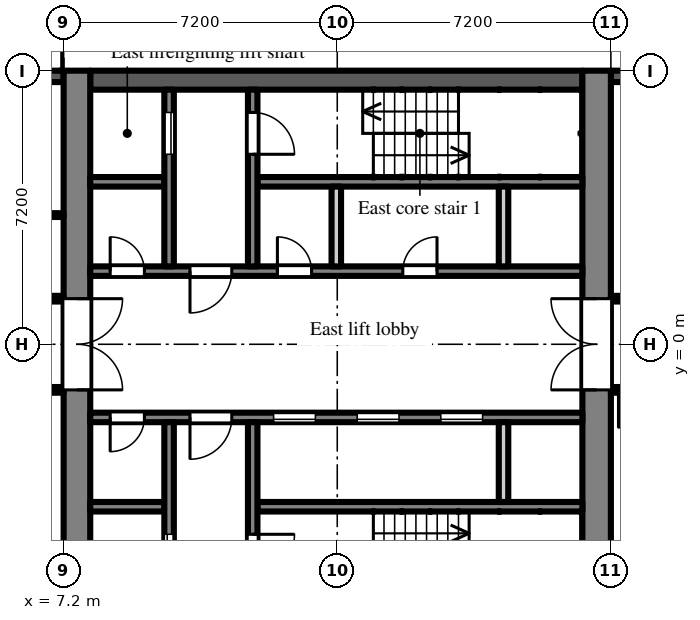
"""IFC4 building model, lengths in metres.
Left out: names, types, materials, properties, quantities, classifications, styles, units other than length and angle.
Written with IfcOpenShell. Run it as: python <this file> out.ifc"""

import sys

from ifc_helpers import new_model, si_unit, direction, frame, frame_2d, origin, place, context, subcontext, project, spatial, rectangle, extrude, element, fill, save


model = new_model("IFC4")
c1 = context("Model", 3, precision=1e-05, world=origin(), true_north=direction((0.0, 1.0)))
c2 = subcontext(c1, "Body", "Model", "MODEL_VIEW")
j1 = project(units=[si_unit("LENGTHUNIT", "METRE"), si_unit("PLANEANGLEUNIT", "RADIAN")], contexts=[c1])
p1 = place(None, origin())
s1 = spatial("IfcSite", under=j1, at=p1, CompositionType="ELEMENT")
p2 = place(p1, origin())
s2 = spatial("IfcBuilding", under=s1, at=p2, CompositionType="ELEMENT")
p3 = place(p2, frame((0.0, 0.0, 102.9)))
s3 = spatial("IfcBuildingStorey", under=s2, at=p3, CompositionType="ELEMENT", Elevation=102.9)
p4 = place(p3, frame((24.3, 7.05, 0.0), z_axis=(0.0, 0.0, 1.0), x_axis=(-1.0, 0.0, 0.0)))
e1 = element("IfcWall", 1, at=p4, inside=s3, PredefinedType="SOLIDWALL", context=c2, shape_type="SweptSolid", body=[
    extrude(rectangle(XDim=2.7, YDim=0.3, at=frame_2d((1.35, 0.0))), origin(), (0.0, 0.0, 1.0), 2.1),
])
p5 = place(p3, frame((7.2, 7.05, 0.0), z_axis=(0.0, 0.0, 1.0), x_axis=(-1.0, 0.0, 0.0)))
e2 = element("IfcWall", 2, at=p5, inside=s3, PredefinedType="SOLIDWALL", context=c2, shape_type="SweptSolid", body=[
    extrude(rectangle(XDim=3.0, YDim=0.3, at=frame_2d((1.5, 0.0))), origin(), (0.0, 0.0, 1.0), 2.1),
])
p6 = place(p3, frame((7.55, -7.2, 0.0), z_axis=(0.0, 0.0, 1.0), x_axis=(0.0, 1.0, 0.0)))
e3 = element("IfcWall", 3, at=p6, inside=s3, PredefinedType="SHEAR", context=c2, shape_type="SweptSolid", body=[
    extrude(rectangle(XDim=14.4, YDim=0.7, at=frame_2d((7.2, 0.0))), origin(), (0.0, 0.0, 1.0), 2.575),
])
p7 = place(p6, frame((6.0, 0.0, 0.0)))
e4 = element("IfcOpeningElement", 4, at=p7, cuts=e3, PredefinedType="OPENING", context=c2, shape_type="SweptSolid", body=[
    extrude(rectangle(XDim=2.4, YDim=2.2, at=frame_2d((1.2, 1.1))), frame((0.0, 0.36, 0.0), z_axis=(0.0, -1.0, 0.0), x_axis=(1.0, 0.0, 0.0)), (0.0, 0.0, 1.0), 0.72),
])
p8 = place(p3, frame((21.225, -7.2, 0.0), z_axis=(0.0, 0.0, 1.0), x_axis=(0.0, 1.0, 0.0)))
e5 = element("IfcWall", 5, at=p8, inside=s3, PredefinedType="SHEAR", context=c2, shape_type="SweptSolid", body=[
    extrude(rectangle(XDim=14.4, YDim=0.75, at=frame_2d((7.2, 0.0))), origin(), (0.0, 0.0, 1.0), 2.575),
])
p9 = place(p8, frame((6.0, 0.0, 0.0)))
e6 = element("IfcOpeningElement", 6, at=p9, cuts=e5, PredefinedType="OPENING", context=c2, shape_type="SweptSolid", body=[
    extrude(rectangle(XDim=2.4, YDim=2.2, at=frame_2d((1.2, 1.1))), frame((0.0, 0.385, 0.0), z_axis=(0.0, -1.0, 0.0), x_axis=(1.0, 0.0, 0.0)), (0.0, 0.0, 1.0), 0.77),
])
p10 = place(p3, frame((7.9, 6.95, 0.0), z_axis=(0.0, 0.0, 1.0), x_axis=(1.0, 0.0, 0.0)))
e7 = element("IfcWall", 7, at=p10, inside=s3, PredefinedType="SHEAR", context=c2, shape_type="SweptSolid", body=[
    extrude(rectangle(XDim=12.95, YDim=0.5, at=frame_2d((6.475, 0.0))), origin(), (0.0, 0.0, 1.0), 2.575),
])
p11 = place(p3, frame((7.9, 1.925, 0.0), z_axis=(0.0, 0.0, 1.0), x_axis=(1.0, 0.0, 0.0)))
e8 = element("IfcWall", 8, at=p11, inside=s3, PredefinedType="SHEAR", context=c2, shape_type="SweptSolid", body=[
    extrude(rectangle(XDim=12.95, YDim=0.25, at=frame_2d((6.475, 0.0))), origin(), (0.0, 0.0, 1.0), 2.575),
])
p12 = place(p11, frame((0.525, 0.0, 0.0)))
e9 = element("IfcOpeningElement", 9, at=p12, cuts=e8, PredefinedType="OPENING", context=c2, shape_type="SweptSolid", body=[
    extrude(rectangle(XDim=0.9, YDim=2.1, at=frame_2d((0.45, 1.05))), frame((0.0, 0.135, 0.0), z_axis=(0.0, -1.0, 0.0), x_axis=(1.0, 0.0, 0.0)), (0.0, 0.0, 1.0), 0.27),
])
p13 = place(p11, frame((2.625, 0.0, 0.0)))
e10 = element("IfcOpeningElement", 10, at=p13, cuts=e8, PredefinedType="OPENING", context=c2, shape_type="SweptSolid", body=[
    extrude(rectangle(XDim=1.1, YDim=2.1, at=frame_2d((0.55, 1.05))), frame((0.0, 0.135, 0.0), z_axis=(0.0, -1.0, 0.0), x_axis=(1.0, 0.0, 0.0)), (0.0, 0.0, 1.0), 0.27),
])
p14 = place(p11, frame((4.925, 0.0, 0.0)))
e11 = element("IfcOpeningElement", 11, at=p14, cuts=e8, PredefinedType="OPENING", context=c2, shape_type="SweptSolid", body=[
    extrude(rectangle(XDim=0.9, YDim=2.1, at=frame_2d((0.45, 1.05))), frame((0.0, 0.135, 0.0), z_axis=(0.0, -1.0, 0.0), x_axis=(1.0, 0.0, 0.0)), (0.0, 0.0, 1.0), 0.27),
])
p15 = place(p11, frame((8.225, 0.0, 0.0)))
e12 = element("IfcOpeningElement", 12, at=p15, cuts=e8, PredefinedType="OPENING", context=c2, shape_type="SweptSolid", body=[
    extrude(rectangle(XDim=0.9, YDim=2.1, at=frame_2d((0.45, 1.05))), frame((0.0, 0.135, 0.0), z_axis=(0.0, -1.0, 0.0), x_axis=(1.0, 0.0, 0.0)), (0.0, 0.0, 1.0), 0.27),
])
p16 = place(p3, frame((7.9, 4.275, 0.0), z_axis=(0.0, 0.0, 1.0), x_axis=(1.0, 0.0, 0.0)))
e13 = element("IfcWall", 13, at=p16, inside=s3, PredefinedType="SHEAR", context=c2, shape_type="SweptSolid", body=[
    extrude(rectangle(XDim=1.95, YDim=0.25, at=frame_2d((0.975, 0.0))), origin(), (0.0, 0.0, 1.0), 2.575),
])
p17 = place(p3, frame((12.3, 4.275, 0.0), z_axis=(0.0, 0.0, 1.0), x_axis=(1.0, 0.0, 0.0)))
e14 = element("IfcWall", 14, at=p17, inside=s3, PredefinedType="SHEAR", context=c2, shape_type="SweptSolid", body=[
    extrude(rectangle(XDim=8.55, YDim=0.25, at=frame_2d((4.275, 0.0))), origin(), (0.0, 0.0, 1.0), 2.575),
])
p18 = place(p3, frame((9.975, 2.05, 0.0), z_axis=(0.0, 0.0, 1.0), x_axis=(0.0, 1.0, 0.0)))
e15 = element("IfcWall", 15, at=p18, inside=s3, PredefinedType="SHEAR", context=c2, shape_type="SweptSolid", body=[
    extrude(rectangle(XDim=4.65, YDim=0.25, at=frame_2d((2.325, 0.0))), origin(), (0.0, 0.0, 1.0), 2.575),
])
p19 = place(p18, frame((2.95, 0.0, 0.0)))
e16 = element("IfcOpeningElement", 16, at=p19, cuts=e15, PredefinedType="OPENING", context=c2, shape_type="SweptSolid", body=[
    extrude(rectangle(XDim=1.1, YDim=2.1, at=frame_2d((0.55, 1.05))), frame((0.0, 0.135, 0.0), z_axis=(0.0, -1.0, 0.0), x_axis=(1.0, 0.0, 0.0)), (0.0, 0.0, 1.0), 0.27),
])
p20 = place(p3, frame((12.175, 2.05, 0.0), z_axis=(0.0, 0.0, 1.0), x_axis=(0.0, 1.0, 0.0)))
e17 = element("IfcWall", 17, at=p20, inside=s3, PredefinedType="SHEAR", context=c2, shape_type="SweptSolid", body=[
    extrude(rectangle(XDim=4.65, YDim=0.25, at=frame_2d((2.325, 0.0))), origin(), (0.0, 0.0, 1.0), 2.575),
])
p21 = place(p20, frame((2.95, 0.0, 0.0)))
e18 = element("IfcOpeningElement", 18, at=p21, cuts=e17, PredefinedType="OPENING", context=c2, shape_type="SweptSolid", body=[
    extrude(rectangle(XDim=1.1, YDim=2.1, at=frame_2d((0.55, 1.05))), frame((0.0, 0.135, 0.0), z_axis=(0.0, -1.0, 0.0), x_axis=(1.0, 0.0, 0.0)), (0.0, 0.0, 1.0), 0.27),
])
for number, where, z_axis, x_axis in (
    (19, (14.375, 2.05, 0.0), (0.0, 0.0, 1.0), (0.0, 1.0, 0.0)),
    (20, (18.775, 2.05, 0.0), (0.0, 0.0, 1.0), (0.0, 1.0, 0.0)),
):
    element("IfcWall", number, at=place(p3, frame(where, z_axis=z_axis, x_axis=x_axis)), inside=s3, PredefinedType="PARTITIONING", context=c2, shape_type="SweptSolid", body=[
        extrude(rectangle(XDim=2.1, YDim=0.25, at=frame_2d((1.05, 0.0))), origin(), (0.0, 0.0, 1.0), 2.575),
    ])
p22 = place(p3, frame((7.9, -1.925, 0.0), z_axis=(0.0, 0.0, 1.0), x_axis=(1.0, 0.0, 0.0)))
e21 = element("IfcWall", 21, at=p22, inside=s3, PredefinedType="SHEAR", context=c2, shape_type="SweptSolid", body=[
    extrude(rectangle(XDim=12.95, YDim=0.25, at=frame_2d((6.475, 0.0))), origin(), (0.0, 0.0, 1.0), 2.575),
])
p23 = place(p22, frame((4.825, 0.0, 0.0)))
e22 = element("IfcOpeningElement", 22, at=p23, cuts=e21, PredefinedType="OPENING", context=c2, shape_type="SweptSolid", body=[
    extrude(rectangle(XDim=1.1, YDim=2.1, at=frame_2d((0.55, 1.05))), frame((0.0, 0.135, 0.0), z_axis=(0.0, -1.0, 0.0), x_axis=(1.0, 0.0, 0.0)), (0.0, 0.0, 1.0), 0.27),
])
p24 = place(p22, frame((7.025, 0.0, 0.0)))
e23 = element("IfcOpeningElement", 23, at=p24, cuts=e21, PredefinedType="OPENING", context=c2, shape_type="SweptSolid", body=[
    extrude(rectangle(XDim=1.1, YDim=2.1, at=frame_2d((0.55, 1.05))), frame((0.0, 0.135, 0.0), z_axis=(0.0, -1.0, 0.0), x_axis=(1.0, 0.0, 0.0)), (0.0, 0.0, 1.0), 0.27),
])
p25 = place(p22, frame((9.225, 0.0, 0.0)))
e24 = element("IfcOpeningElement", 24, at=p25, cuts=e21, PredefinedType="OPENING", context=c2, shape_type="SweptSolid", body=[
    extrude(rectangle(XDim=1.1, YDim=2.1, at=frame_2d((0.55, 1.05))), frame((0.0, 0.135, 0.0), z_axis=(0.0, -1.0, 0.0), x_axis=(1.0, 0.0, 0.0)), (0.0, 0.0, 1.0), 0.27),
])
p26 = place(p22, frame((0.525, 0.0, 0.0)))
e25 = element("IfcOpeningElement", 25, at=p26, cuts=e21, PredefinedType="OPENING", context=c2, shape_type="SweptSolid", body=[
    extrude(rectangle(XDim=0.9, YDim=2.1, at=frame_2d((0.45, 1.05))), frame((0.0, 0.135, 0.0), z_axis=(0.0, -1.0, 0.0), x_axis=(1.0, 0.0, 0.0)), (0.0, 0.0, 1.0), 0.27),
])
p27 = place(p22, frame((2.625, 0.0, 0.0)))
e26 = element("IfcOpeningElement", 26, at=p27, cuts=e21, PredefinedType="OPENING", context=c2, shape_type="SweptSolid", body=[
    extrude(rectangle(XDim=1.1, YDim=2.1, at=frame_2d((0.55, 1.05))), frame((0.0, 0.135, 0.0), z_axis=(0.0, -1.0, 0.0), x_axis=(1.0, 0.0, 0.0)), (0.0, 0.0, 1.0), 0.27),
])
p28 = place(p3, frame((7.9, -4.275, 0.0), z_axis=(0.0, 0.0, 1.0), x_axis=(1.0, 0.0, 0.0)))
e27 = element("IfcWall", 27, at=p28, inside=s3, PredefinedType="SHEAR", context=c2, shape_type="SweptSolid", body=[
    extrude(rectangle(XDim=1.95, YDim=0.25, at=frame_2d((0.975, 0.0))), origin(), (0.0, 0.0, 1.0), 2.575),
])
p29 = place(p3, frame((12.3, -4.275, 0.0), z_axis=(0.0, 0.0, 1.0), x_axis=(1.0, 0.0, 0.0)))
e28 = element("IfcWall", 28, at=p29, inside=s3, PredefinedType="SHEAR", context=c2, shape_type="SweptSolid", body=[
    extrude(rectangle(XDim=8.55, YDim=0.25, at=frame_2d((4.275, 0.0))), origin(), (0.0, 0.0, 1.0), 2.575),
])
p30 = place(p3, frame((9.975, -2.05, 0.0), z_axis=(0.0, 0.0, 1.0), x_axis=(0.0, -1.0, 0.0)))
e29 = element("IfcWall", 29, at=p30, inside=s3, PredefinedType="SHEAR", context=c2, shape_type="SweptSolid", body=[
    extrude(rectangle(XDim=4.65, YDim=0.25, at=frame_2d((2.325, 0.0))), origin(), (0.0, 0.0, 1.0), 2.575),
])
p31 = place(p30, frame((2.95, 0.0, 0.0)))
e30 = element("IfcOpeningElement", 30, at=p31, cuts=e29, PredefinedType="OPENING", context=c2, shape_type="SweptSolid", body=[
    extrude(rectangle(XDim=1.1, YDim=2.1, at=frame_2d((0.55, 1.05))), frame((0.0, 0.135, 0.0), z_axis=(0.0, -1.0, 0.0), x_axis=(1.0, 0.0, 0.0)), (0.0, 0.0, 1.0), 0.27),
])
p32 = place(p3, frame((12.175, -2.05, 0.0), z_axis=(0.0, 0.0, 1.0), x_axis=(0.0, -1.0, 0.0)))
e31 = element("IfcWall", 31, at=p32, inside=s3, PredefinedType="SHEAR", context=c2, shape_type="SweptSolid", body=[
    extrude(rectangle(XDim=4.65, YDim=0.25, at=frame_2d((2.325, 0.0))), origin(), (0.0, 0.0, 1.0), 2.575),
])
p33 = place(p32, frame((2.95, 0.0, 0.0)))
e32 = element("IfcOpeningElement", 32, at=p33, cuts=e31, PredefinedType="OPENING", context=c2, shape_type="SweptSolid", body=[
    extrude(rectangle(XDim=1.1, YDim=2.1, at=frame_2d((0.55, 1.05))), frame((0.0, 0.135, 0.0), z_axis=(0.0, -1.0, 0.0), x_axis=(1.0, 0.0, 0.0)), (0.0, 0.0, 1.0), 0.27),
])
p34 = place(p3, frame((18.775, -2.05, 0.0), z_axis=(0.0, 0.0, 1.0), x_axis=(0.0, -1.0, 0.0)))
e33 = element("IfcWall", 33, at=p34, inside=s3, PredefinedType="PARTITIONING", context=c2, shape_type="SweptSolid", body=[
    extrude(rectangle(XDim=2.1, YDim=0.25, at=frame_2d((1.05, 0.0))), origin(), (0.0, 0.0, 1.0), 2.575),
])
p35 = place(p3, frame((1.275, -1.2, 0.0), z_axis=(0.0, 0.0, 1.0), x_axis=(1.0, 0.0, 0.0)))
e34 = element("IfcWall", 34, at=p35, inside=s3, PredefinedType="PARTITIONING", context=c2, shape_type="SweptSolid", body=[
    extrude(rectangle(XDim=5.925, YDim=0.15, at=frame_2d((2.962, 0.0))), origin(), (0.0, 0.0, 1.0), 2.575),
])
p36 = place(p35, frame((3.075, 0.0, 0.0)))
e35 = element("IfcOpeningElement", 35, at=p36, cuts=e34, PredefinedType="OPENING", context=c2, shape_type="SweptSolid", body=[
    extrude(rectangle(XDim=0.9, YDim=2.1, at=frame_2d((0.45, 1.05))), frame((0.0, 0.085, 0.0), z_axis=(0.0, -1.0, 0.0), x_axis=(1.0, 0.0, 0.0)), (0.0, 0.0, 1.0), 0.17),
])
p37 = place(p3, frame((1.275, 1.2, 0.0), z_axis=(0.0, 0.0, 1.0), x_axis=(1.0, 0.0, 0.0)))
e36 = element("IfcWall", 36, at=p37, inside=s3, PredefinedType="PARTITIONING", context=c2, shape_type="SweptSolid", body=[
    extrude(rectangle(XDim=5.925, YDim=0.15, at=frame_2d((2.962, 0.0))), origin(), (0.0, 0.0, 1.0), 2.575),
])
p38 = place(p37, frame((2.475, 0.0, 0.0)))
e37 = element("IfcOpeningElement", 37, at=p38, cuts=e36, PredefinedType="OPENING", context=c2, shape_type="SweptSolid", body=[
    extrude(rectangle(XDim=0.9, YDim=2.1, at=frame_2d((0.45, 1.05))), frame((0.0, 0.085, 0.0), z_axis=(0.0, -1.0, 0.0), x_axis=(1.0, 0.0, 0.0)), (0.0, 0.0, 1.0), 0.17),
])
p39 = place(p3, frame((1.275, 3.4, 0.0), z_axis=(0.0, 0.0, 1.0), x_axis=(1.0, 0.0, 0.0)))
e38 = element("IfcWall", 38, at=p39, inside=s3, PredefinedType="PARTITIONING", context=c2, shape_type="SweptSolid", body=[
    extrude(rectangle(XDim=5.925, YDim=0.1, at=frame_2d((2.962, 0.0))), origin(), (0.0, 0.0, 1.0), 2.575),
])
p40 = place(p3, frame((21.6, -1.2, 0.0), z_axis=(0.0, 0.0, 1.0), x_axis=(1.0, 0.0, 0.0)))
e39 = element("IfcWall", 39, at=p40, inside=s3, PredefinedType="PARTITIONING", context=c2, shape_type="SweptSolid", body=[
    extrude(rectangle(XDim=14.9, YDim=0.15, at=frame_2d((7.45, 0.0))), origin(), (0.0, 0.0, 1.0), 2.575),
])
p41 = place(p40, frame((0.2, 0.0, 0.0)))
e40 = element("IfcOpeningElement", 40, at=p41, cuts=e39, PredefinedType="OPENING", context=c2, shape_type="SweptSolid", body=[
    extrude(rectangle(XDim=1.0, YDim=2.1, at=frame_2d((0.5, 1.05))), frame((0.0, 0.085, 0.0), z_axis=(0.0, -1.0, 0.0), x_axis=(1.0, 0.0, 0.0)), (0.0, 0.0, 1.0), 0.17),
])
p42 = place(p40, frame((5.71, 0.0, 0.0)))
e41 = element("IfcOpeningElement", 41, at=p42, cuts=e39, PredefinedType="OPENING", context=c2, shape_type="SweptSolid", body=[
    extrude(rectangle(XDim=1.0, YDim=2.1, at=frame_2d((0.5, 1.05))), frame((0.0, 0.085, 0.0), z_axis=(0.0, -1.0, 0.0), x_axis=(1.0, 0.0, 0.0)), (0.0, 0.0, 1.0), 0.17),
])
p43 = place(p40, frame((11.95, 0.0, 0.0)))
e42 = element("IfcOpeningElement", 42, at=p43, cuts=e39, PredefinedType="OPENING", context=c2, shape_type="SweptSolid", body=[
    extrude(rectangle(XDim=1.8, YDim=2.1, at=frame_2d((0.9, 1.05))), frame((0.0, 0.085, 0.0), z_axis=(0.0, -1.0, 0.0), x_axis=(1.0, 0.0, 0.0)), (0.0, 0.0, 1.0), 0.17),
])
p44 = place(p3, frame((21.6, 1.2, 0.0), z_axis=(0.0, 0.0, 1.0), x_axis=(1.0, 0.0, 0.0)))
e43 = element("IfcWall", 43, at=p44, inside=s3, PredefinedType="PARTITIONING", context=c2, shape_type="SweptSolid", body=[
    extrude(rectangle(XDim=14.9, YDim=0.15, at=frame_2d((7.45, 0.0))), origin(), (0.0, 0.0, 1.0), 2.575),
])
p45 = place(p44, frame((0.45, 0.0, 0.0)))
e44 = element("IfcOpeningElement", 44, at=p45, cuts=e43, PredefinedType="OPENING", context=c2, shape_type="SweptSolid", body=[
    extrude(rectangle(XDim=0.9, YDim=2.1, at=frame_2d((0.45, 1.05))), frame((0.0, 0.085, 0.0), z_axis=(0.0, -1.0, 0.0), x_axis=(1.0, 0.0, 0.0)), (0.0, 0.0, 1.0), 0.17),
])
p46 = place(p44, frame((2.25, 0.0, 0.0)))
e45 = element("IfcOpeningElement", 45, at=p46, cuts=e43, PredefinedType="OPENING", context=c2, shape_type="SweptSolid", body=[
    extrude(rectangle(XDim=0.9, YDim=2.1, at=frame_2d((0.45, 1.05))), frame((0.0, 0.085, 0.0), z_axis=(0.0, -1.0, 0.0), x_axis=(1.0, 0.0, 0.0)), (0.0, 0.0, 1.0), 0.17),
])
p47 = place(p44, frame((6.3, 0.0, 0.0)))
e46 = element("IfcOpeningElement", 46, at=p47, cuts=e43, PredefinedType="OPENING", context=c2, shape_type="SweptSolid", body=[
    extrude(rectangle(XDim=1.8, YDim=2.1, at=frame_2d((0.9, 1.05))), frame((0.0, 0.085, 0.0), z_axis=(0.0, -1.0, 0.0), x_axis=(1.0, 0.0, 0.0)), (0.0, 0.0, 1.0), 0.17),
])
p48 = place(p44, frame((11.95, 0.0, 0.0)))
e47 = element("IfcOpeningElement", 47, at=p48, cuts=e43, PredefinedType="OPENING", context=c2, shape_type="SweptSolid", body=[
    extrude(rectangle(XDim=1.8, YDim=2.1, at=frame_2d((0.9, 1.05))), frame((0.0, 0.085, 0.0), z_axis=(0.0, -1.0, 0.0), x_axis=(1.0, 0.0, 0.0)), (0.0, 0.0, 1.0), 0.17),
])
p49 = place(p23, origin())
e48 = element("IfcDoor", 48, at=p49, inside=s3, OperationType="SLIDING_TO_LEFT", PredefinedType="DOOR", context=c2, shape_type="SweptSolid", body=[
    extrude(rectangle(XDim=1.1, YDim=2.1, at=frame_2d((0.55, 1.05))), frame((0.0, 0.025, 0.0), z_axis=(0.0, -1.0, 0.0), x_axis=(1.0, 0.0, 0.0)), (0.0, 0.0, 1.0), 0.05),
])
fill(e22, e48)
p50 = place(p24, origin())
e49 = element("IfcDoor", 49, at=p50, inside=s3, OperationType="SLIDING_TO_LEFT", PredefinedType="DOOR", context=c2, shape_type="SweptSolid", body=[
    extrude(rectangle(XDim=1.1, YDim=2.1, at=frame_2d((0.55, 1.05))), frame((0.0, 0.025, 0.0), z_axis=(0.0, -1.0, 0.0), x_axis=(1.0, 0.0, 0.0)), (0.0, 0.0, 1.0), 0.05),
])
fill(e23, e49)
p51 = place(p25, origin())
e50 = element("IfcDoor", 50, at=p51, inside=s3, OperationType="SLIDING_TO_LEFT", PredefinedType="DOOR", context=c2, shape_type="SweptSolid", body=[
    extrude(rectangle(XDim=1.1, YDim=2.1, at=frame_2d((0.55, 1.05))), frame((0.0, 0.025, 0.0), z_axis=(0.0, -1.0, 0.0), x_axis=(1.0, 0.0, 0.0)), (0.0, 0.0, 1.0), 0.05),
])
fill(e24, e50)
p52 = place(p19, origin())
e51 = element("IfcDoor", 51, at=p52, inside=s3, OperationType="SLIDING_TO_LEFT", PredefinedType="DOOR", context=c2, shape_type="SweptSolid", body=[
    extrude(rectangle(XDim=1.1, YDim=2.1, at=frame_2d((0.55, 1.05))), frame((0.0, 0.025, 0.0), z_axis=(0.0, -1.0, 0.0), x_axis=(1.0, 0.0, 0.0)), (0.0, 0.0, 1.0), 0.05),
])
fill(e16, e51)
p53 = place(p31, origin())
e52 = element("IfcDoor", 52, at=p53, inside=s3, OperationType="SLIDING_TO_LEFT", PredefinedType="DOOR", context=c2, shape_type="SweptSolid", body=[
    extrude(rectangle(XDim=1.1, YDim=2.1, at=frame_2d((0.55, 1.05))), frame((0.0, 0.025, 0.0), z_axis=(0.0, -1.0, 0.0), x_axis=(1.0, 0.0, 0.0)), (0.0, 0.0, 1.0), 0.05),
])
fill(e30, e52)
p54 = place(p21, frame((1.1, 0.0, 0.0), z_axis=(0.0, 0.0, 1.0), x_axis=(-1.0, 0.0, 0.0)))
e53 = element("IfcDoor", 53, at=p54, inside=s3, OperationType="SINGLE_SWING_RIGHT", PredefinedType="DOOR", context=c2, shape_type="SweptSolid", body=[
    extrude(rectangle(XDim=1.1, YDim=2.1, at=frame_2d((0.55, 1.05))), frame((0.0, 0.025, 0.0), z_axis=(0.0, -1.0, 0.0), x_axis=(1.0, 0.0, 0.0)), (0.0, 0.0, 1.0), 0.05),
])
fill(e18, e53)
p55 = place(p33, origin())
e54 = element("IfcDoor", 54, at=p55, inside=s3, OperationType="SINGLE_SWING_LEFT", PredefinedType="DOOR", context=c2, shape_type="SweptSolid", body=[
    extrude(rectangle(XDim=1.1, YDim=2.1, at=frame_2d((0.55, 1.05))), frame((0.0, 0.025, 0.0), z_axis=(0.0, -1.0, 0.0), x_axis=(1.0, 0.0, 0.0)), (0.0, 0.0, 1.0), 0.05),
])
fill(e32, e54)
p56 = place(p12, origin())
e55 = element("IfcDoor", 55, at=p56, inside=s3, OperationType="SINGLE_SWING_LEFT", PredefinedType="DOOR", context=c2, shape_type="SweptSolid", body=[
    extrude(rectangle(XDim=0.9, YDim=2.1, at=frame_2d((0.45, 1.05))), frame((0.0, 0.025, 0.0), z_axis=(0.0, -1.0, 0.0), x_axis=(1.0, 0.0, 0.0)), (0.0, 0.0, 1.0), 0.05),
])
fill(e9, e55)
p57 = place(p26, frame((0.9, 0.0, 0.0), z_axis=(0.0, 0.0, 1.0), x_axis=(-1.0, 0.0, 0.0)))
e56 = element("IfcDoor", 56, at=p57, inside=s3, OperationType="SINGLE_SWING_RIGHT", PredefinedType="DOOR", context=c2, shape_type="SweptSolid", body=[
    extrude(rectangle(XDim=0.9, YDim=2.1, at=frame_2d((0.45, 1.05))), frame((0.0, 0.025, 0.0), z_axis=(0.0, -1.0, 0.0), x_axis=(1.0, 0.0, 0.0)), (0.0, 0.0, 1.0), 0.05),
])
fill(e25, e56)
p58 = place(p13, frame((1.1, 0.0, 0.0), z_axis=(0.0, 0.0, 1.0), x_axis=(-1.0, 0.0, 0.0)))
e57 = element("IfcDoor", 57, at=p58, inside=s3, OperationType="SINGLE_SWING_RIGHT", PredefinedType="DOOR", context=c2, shape_type="SweptSolid", body=[
    extrude(rectangle(XDim=1.1, YDim=2.1, at=frame_2d((0.55, 1.05))), frame((0.0, 0.025, 0.0), z_axis=(0.0, -1.0, 0.0), x_axis=(1.0, 0.0, 0.0)), (0.0, 0.0, 1.0), 0.05),
])
fill(e10, e57)
p59 = place(p27, frame((1.1, 0.0, 0.0), z_axis=(0.0, 0.0, 1.0), x_axis=(-1.0, 0.0, 0.0)))
e58 = element("IfcDoor", 58, at=p59, inside=s3, OperationType="SINGLE_SWING_RIGHT", PredefinedType="DOOR", context=c2, shape_type="SweptSolid", body=[
    extrude(rectangle(XDim=1.1, YDim=2.1, at=frame_2d((0.55, 1.05))), frame((0.0, 0.025, 0.0), z_axis=(0.0, -1.0, 0.0), x_axis=(1.0, 0.0, 0.0)), (0.0, 0.0, 1.0), 0.05),
])
fill(e26, e58)
p60 = place(p7, frame((2.4, 0.0, 0.0), z_axis=(0.0, 0.0, 1.0), x_axis=(-1.0, 0.0, 0.0)))
e59 = element("IfcDoor", 59, at=p60, inside=s3, OperationType="DOUBLE_DOOR_DOUBLE_SWING", PredefinedType="DOOR", context=c2, shape_type="SweptSolid", body=[
    extrude(rectangle(XDim=2.4, YDim=2.2, at=frame_2d((1.2, 1.1))), frame((0.0, 0.025, 0.0), z_axis=(0.0, -1.0, 0.0), x_axis=(1.0, 0.0, 0.0)), (0.0, 0.0, 1.0), 0.05),
])
fill(e4, e59)
p61 = place(p9, origin())
e60 = element("IfcDoor", 60, at=p61, inside=s3, OperationType="DOUBLE_DOOR_DOUBLE_SWING", PredefinedType="DOOR", context=c2, shape_type="SweptSolid", body=[
    extrude(rectangle(XDim=2.4, YDim=2.2, at=frame_2d((1.2, 1.1))), frame((0.0, 0.025, 0.0), z_axis=(0.0, -1.0, 0.0), x_axis=(1.0, 0.0, 0.0)), (0.0, 0.0, 1.0), 0.05),
])
fill(e6, e60)
p62 = place(p14, origin())
e61 = element("IfcDoor", 61, at=p62, inside=s3, OperationType="SINGLE_SWING_LEFT", PredefinedType="DOOR", context=c2, shape_type="SweptSolid", body=[
    extrude(rectangle(XDim=0.9, YDim=2.1, at=frame_2d((0.45, 1.05))), frame((0.0, 0.025, 0.0), z_axis=(0.0, -1.0, 0.0), x_axis=(1.0, 0.0, 0.0)), (0.0, 0.0, 1.0), 0.05),
])
fill(e11, e61)
p63 = place(p15, origin())
e62 = element("IfcDoor", 62, at=p63, inside=s3, OperationType="SINGLE_SWING_RIGHT", PredefinedType="DOOR", context=c2, shape_type="SweptSolid", body=[
    extrude(rectangle(XDim=0.9, YDim=2.1, at=frame_2d((0.45, 1.05))), frame((0.0, 0.025, 0.0), z_axis=(0.0, -1.0, 0.0), x_axis=(1.0, 0.0, 0.0)), (0.0, 0.0, 1.0), 0.05),
])
fill(e12, e62)
p64 = place(p41, frame((1.0, 0.0, 0.0), z_axis=(0.0, 0.0, 1.0), x_axis=(-1.0, 0.0, 0.0)))
e63 = element("IfcDoor", 63, at=p64, inside=s3, OperationType="SINGLE_SWING_RIGHT", PredefinedType="DOOR", context=c2, shape_type="SweptSolid", body=[
    extrude(rectangle(XDim=1.0, YDim=2.1, at=frame_2d((0.5, 1.05))), frame((0.0, 0.025, 0.0), z_axis=(0.0, -1.0, 0.0), x_axis=(1.0, 0.0, 0.0)), (0.0, 0.0, 1.0), 0.05),
])
fill(e40, e63)
save(model, sys.argv[1])
